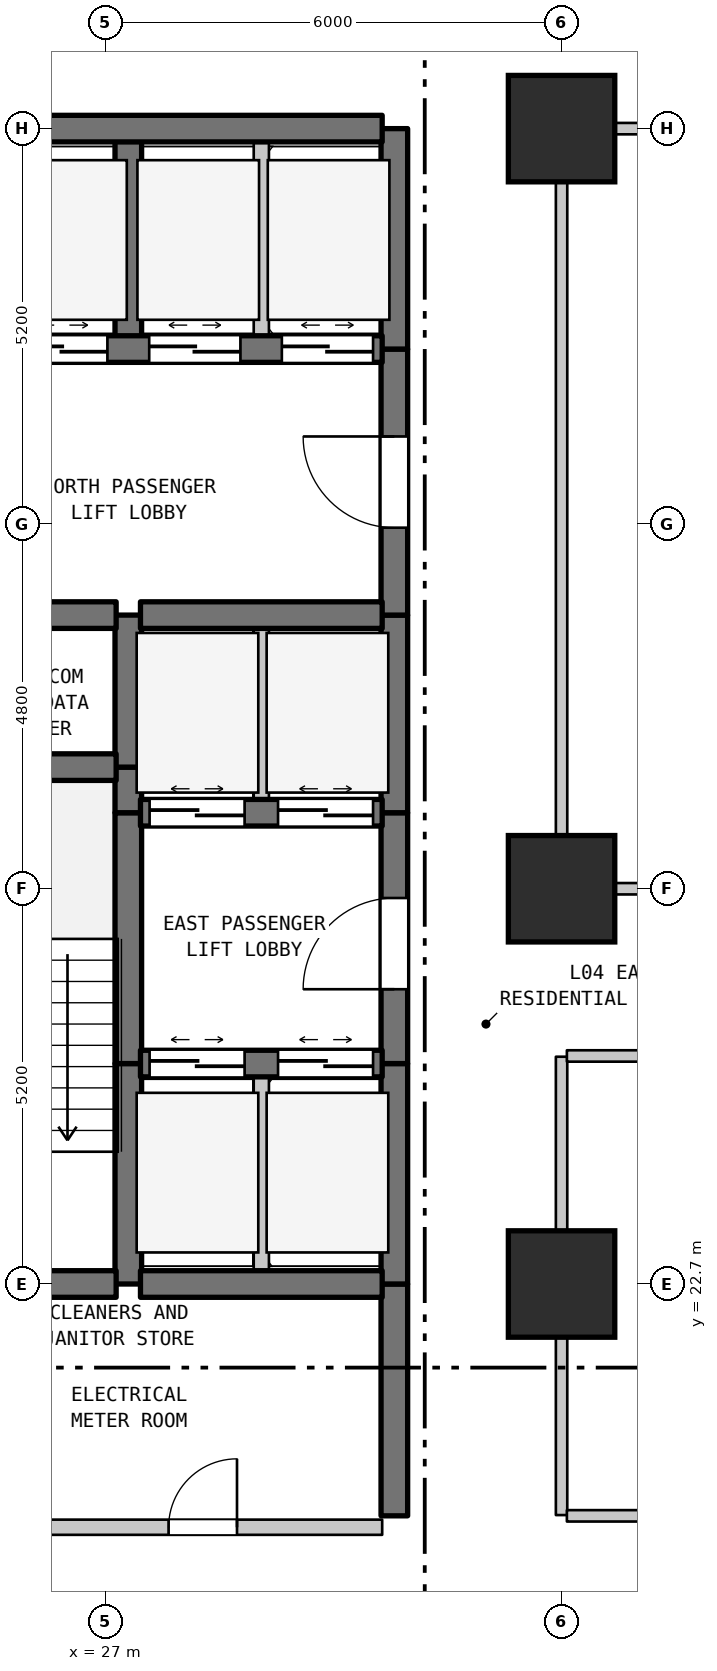
"""IFC4 building model, lengths in metres.
Left out: names, types, materials, properties, quantities, classifications, styles, units other than length and angle.
Written with IfcOpenShell. Run it as: python <this file> out.ifc"""

import sys

from ifc_helpers import new_model, si_unit, direction, frame, frame_2d, origin, origin_2d, place, context, subcontext, project, spatial, rectangle, extrude, element, fill, save


model = new_model("IFC4")
c1 = context("Model", 3, precision=1e-05, world=origin(), true_north=direction((0.0, 1.0)))
c2 = subcontext(c1, "Body", "Model", "MODEL_VIEW")
j1 = project(units=[si_unit("LENGTHUNIT", "METRE"), si_unit("PLANEANGLEUNIT", "RADIAN")], contexts=[c1])
p1 = place(None, origin())
s1 = spatial("IfcSite", under=j1, at=p1, CompositionType="ELEMENT")
p2 = place(p1, origin())
s2 = spatial("IfcBuilding", under=s1, at=p2, CompositionType="ELEMENT")
p3 = place(p2, frame((0.0, 0.0, 24.0)))
s3 = spatial("IfcBuildingStorey", under=s2, at=p3, CompositionType="ELEMENT", Elevation=24.0)
for number, where, z_axis, x_axis in (
    (1, (33.0, 22.7, 0.0), (0.0, 0.0, 1.0), (1.0, 0.0, 0.0)),
    (2, (33.0, 27.9, 0.0), (0.0, 0.0, 1.0), (1.0, 0.0, 0.0)),
    (3, (33.0, 37.9, 0.0), (0.0, 0.0, 1.0), (1.0, 0.0, 0.0)),
):
    element("IfcColumn", number, at=place(p3, frame(where, z_axis=z_axis, x_axis=x_axis)), inside=s3, PredefinedType="COLUMN", context=c2, shape_type="SweptSolid", body=[
        extrude(rectangle(XDim=1.4, YDim=1.4, at=origin_2d()), origin(), (0.0, 0.0, 1.0), 3.7),
    ])
p4 = place(p3, frame((27.3, 22.7, 0.0), z_axis=(0.0, 0.0, 1.0), x_axis=(0.0, 1.0, 0.0)))
e4 = element("IfcWall", 4, at=p4, inside=s3, PredefinedType="SHEAR", context=c2, shape_type="SweptSolid", body=[
    extrude(rectangle(XDim=2.9, YDim=0.35, at=frame_2d((1.45, 0.0))), origin(), (0.0, 0.0, 1.0), 3.385),
])
p5 = place(p3, frame((27.3, 25.6, 0.0), z_axis=(0.0, 0.0, 1.0), x_axis=(0.0, 1.0, 0.0)))
e5 = element("IfcWall", 5, at=p5, inside=s3, PredefinedType="SHEAR", context=c2, shape_type="SweptSolid", body=[
    extrude(rectangle(XDim=3.3, YDim=0.35, at=frame_2d((1.65, 0.0))), origin(), (0.0, 0.0, 1.0), 3.385),
])
p6 = place(p3, frame((27.3, 28.9, 0.0), z_axis=(0.0, 0.0, 1.0), x_axis=(0.0, 1.0, 0.0)))
e6 = element("IfcWall", 6, at=p6, inside=s3, PredefinedType="SHEAR", context=c2, shape_type="SweptSolid", body=[
    extrude(rectangle(XDim=0.6, YDim=0.35, at=frame_2d((0.3, 0.0))), origin(), (0.0, 0.0, 1.0), 3.385),
])
p7 = place(p3, frame((27.3, 29.5, 0.0), z_axis=(0.0, 0.0, 1.0), x_axis=(0.0, 1.0, 0.0)))
e7 = element("IfcWall", 7, at=p7, inside=s3, PredefinedType="SHEAR", context=c2, shape_type="SweptSolid", body=[
    extrude(rectangle(XDim=2.0, YDim=0.35, at=frame_2d((1.0, 0.0))), origin(), (0.0, 0.0, 1.0), 3.385),
])
p8 = place(p3, frame((27.3, 35.0, 0.0), z_axis=(0.0, 0.0, 1.0), x_axis=(0.0, 1.0, 0.0)))
e8 = element("IfcWall", 8, at=p8, inside=s3, PredefinedType="SHEAR", context=c2, shape_type="SweptSolid", body=[
    extrude(rectangle(XDim=2.9, YDim=0.35, at=frame_2d((1.45, 0.0))), origin(), (0.0, 0.0, 1.0), 3.385),
])
p9 = place(p3, frame((29.05, 22.7, 0.0), z_axis=(0.0, 0.0, 1.0), x_axis=(0.0, 1.0, 0.0)))
e9 = element("IfcWall", 9, at=p9, inside=s3, PredefinedType="STANDARD", context=c2, shape_type="SweptSolid", body=[
    extrude(rectangle(XDim=2.9, YDim=0.2, at=frame_2d((1.45, 0.0))), origin(), (0.0, 0.0, 1.0), 3.385),
])
p10 = place(p3, frame((29.05, 28.9, 0.0), z_axis=(0.0, 0.0, 1.0), x_axis=(0.0, 1.0, 0.0)))
e10 = element("IfcWall", 10, at=p10, inside=s3, PredefinedType="STANDARD", context=c2, shape_type="SweptSolid", body=[
    extrude(rectangle(XDim=2.6, YDim=0.2, at=frame_2d((1.3, 0.0))), origin(), (0.0, 0.0, 1.0), 3.385),
])
p11 = place(p3, frame((29.05, 35.0, 0.0), z_axis=(0.0, 0.0, 1.0), x_axis=(0.0, 1.0, 0.0)))
e11 = element("IfcWall", 11, at=p11, inside=s3, PredefinedType="STANDARD", context=c2, shape_type="SweptSolid", body=[
    extrude(rectangle(XDim=2.9, YDim=0.2, at=frame_2d((1.45, 0.0))), origin(), (0.0, 0.0, 1.0), 3.385),
])
p12 = place(p3, frame((30.8, 19.65, 0.0), z_axis=(0.0, 0.0, 1.0), x_axis=(0.0, 1.0, 0.0)))
e12 = element("IfcWall", 12, at=p12, inside=s3, PredefinedType="SHEAR", context=c2, shape_type="SweptSolid", body=[
    extrude(rectangle(XDim=3.05, YDim=0.35, at=frame_2d((1.525, 0.0))), origin(), (0.0, 0.0, 1.0), 3.385),
])
p13 = place(p3, frame((30.8, 22.7, 0.0), z_axis=(0.0, 0.0, 1.0), x_axis=(0.0, 1.0, 0.0)))
e13 = element("IfcWall", 13, at=p13, inside=s3, PredefinedType="SHEAR", context=c2, shape_type="SweptSolid", body=[
    extrude(rectangle(XDim=2.9, YDim=0.35, at=frame_2d((1.45, 0.0))), origin(), (0.0, 0.0, 1.0), 3.385),
])
p14 = place(p3, frame((30.8, 25.6, 0.0), z_axis=(0.0, 0.0, 1.0), x_axis=(0.0, 1.0, 0.0)))
e14 = element("IfcWall", 14, at=p14, inside=s3, PredefinedType="SHEAR", context=c2, shape_type="SweptSolid", body=[
    extrude(rectangle(XDim=3.3, YDim=0.35, at=frame_2d((1.65, 0.0))), origin(), (0.0, 0.0, 1.0), 3.385),
])
p15 = place(p14, frame((0.978, 0.0, 0.0)))
e15 = element("IfcOpeningElement", 15, at=p15, cuts=e14, PredefinedType="OPENING", context=c2, shape_type="SweptSolid", body=[
    extrude(rectangle(XDim=1.2, YDim=2.2, at=frame_2d((0.6, 1.1))), frame((0.0, 0.185, 0.0), z_axis=(0.0, -1.0, 0.0), x_axis=(1.0, 0.0, 0.0)), (0.0, 0.0, 1.0), 0.37),
])
p16 = place(p3, frame((30.8, 28.9, 0.0), z_axis=(0.0, 0.0, 1.0), x_axis=(0.0, 1.0, 0.0)))
e16 = element("IfcWall", 16, at=p16, inside=s3, PredefinedType="SHEAR", context=c2, shape_type="SweptSolid", body=[
    extrude(rectangle(XDim=2.6, YDim=0.35, at=frame_2d((1.3, 0.0))), origin(), (0.0, 0.0, 1.0), 3.385),
])
p17 = place(p3, frame((30.8, 31.5, 0.0), z_axis=(0.0, 0.0, 1.0), x_axis=(0.0, 1.0, 0.0)))
e17 = element("IfcWall", 17, at=p17, inside=s3, PredefinedType="SHEAR", context=c2, shape_type="SweptSolid", body=[
    extrude(rectangle(XDim=3.5, YDim=0.35, at=frame_2d((1.75, 0.0))), origin(), (0.0, 0.0, 1.0), 3.385),
])
p18 = place(p17, frame((1.15, 0.0, 0.0)))
e18 = element("IfcOpeningElement", 18, at=p18, cuts=e17, PredefinedType="OPENING", context=c2, shape_type="SweptSolid", body=[
    extrude(rectangle(XDim=1.2, YDim=2.2, at=frame_2d((0.6, 1.1))), frame((0.0, 0.185, 0.0), z_axis=(0.0, -1.0, 0.0), x_axis=(1.0, 0.0, 0.0)), (0.0, 0.0, 1.0), 0.37),
])
p19 = place(p3, frame((30.8, 35.0, 0.0), z_axis=(0.0, 0.0, 1.0), x_axis=(0.0, 1.0, 0.0)))
e19 = element("IfcWall", 19, at=p19, inside=s3, PredefinedType="SHEAR", context=c2, shape_type="SweptSolid", body=[
    extrude(rectangle(XDim=2.9, YDim=0.35, at=frame_2d((1.45, 0.0))), origin(), (0.0, 0.0, 1.0), 3.385),
])
p20 = place(p3, frame((33.0, 19.66, 0.0), z_axis=(0.0, 0.0, 1.0), x_axis=(0.0, 1.0, 0.0)))
e20 = element("IfcWall", 20, at=p20, inside=s3, PredefinedType="STANDARD", context=c2, shape_type="SweptSolid", body=[
    extrude(rectangle(XDim=6.03, YDim=0.15, at=frame_2d((3.015, 0.0))), origin(), (0.0, 0.0, 1.0), 2.885),
])
p21 = place(p3, frame((33.0, 27.91, 0.0), z_axis=(0.0, 0.0, 1.0), x_axis=(0.0, 1.0, 0.0)))
e21 = element("IfcWall", 21, at=p21, inside=s3, PredefinedType="STANDARD", context=c2, shape_type="SweptSolid", body=[
    extrude(rectangle(XDim=9.98, YDim=0.15, at=frame_2d((4.99, 0.0))), origin(), (0.0, 0.0, 1.0), 2.885),
])
p22 = place(p3, frame((25.985, 19.5, 0.0), z_axis=(0.0, 0.0, 1.0), x_axis=(1.0, 0.0, 0.0)))
e22 = element("IfcWall", 22, at=p22, inside=s3, PredefinedType="STANDARD", context=c2, shape_type="SweptSolid", body=[
    extrude(rectangle(XDim=4.655, YDim=0.2, at=frame_2d((2.327, 0.0))), origin(), (0.0, 0.0, 1.0), 3.385),
])
p23 = place(p22, frame((1.845, 0.0, 0.0)))
e23 = element("IfcOpeningElement", 23, at=p23, cuts=e22, PredefinedType="OPENING", context=c2, shape_type="SweptSolid", body=[
    extrude(rectangle(XDim=0.9, YDim=2.15, at=frame_2d((0.45, 1.075))), frame((0.0, 0.11, 0.0), z_axis=(0.0, -1.0, 0.0), x_axis=(1.0, 0.0, 0.0)), (0.0, 0.0, 1.0), 0.22),
])
p24 = place(p3, frame((33.07, 19.65, 0.0), z_axis=(0.0, 0.0, 1.0), x_axis=(1.0, 0.0, 0.0)))
e24 = element("IfcWall", 24, at=p24, inside=s3, PredefinedType="STANDARD", context=c2, shape_type="SweptSolid", body=[
    extrude(rectangle(XDim=33.27, YDim=0.15, at=frame_2d((16.635, 0.0))), origin(), (0.0, 0.0, 1.0), 3.385),
])
p25 = place(p24, frame((16.065, 0.0, 0.0)))
e25 = element("IfcOpeningElement", 25, at=p25, cuts=e24, PredefinedType="OPENING", context=c2, shape_type="SweptSolid", body=[
    extrude(rectangle(XDim=1.0, YDim=2.15, at=frame_2d((0.5, 1.075))), frame((0.0, 0.085, 0.0), z_axis=(0.0, -1.0, 0.0), x_axis=(1.0, 0.0, 0.0)), (0.0, 0.0, 1.0), 0.17),
])
p26 = place(p3, frame((25.985, 22.7, 0.0), z_axis=(0.0, 0.0, 1.0), x_axis=(1.0, 0.0, 0.0)))
e26 = element("IfcWall", 26, at=p26, inside=s3, PredefinedType="SHEAR", context=c2, shape_type="SweptSolid", body=[
    extrude(rectangle(XDim=1.155, YDim=0.35, at=frame_2d((0.577, 0.0))), origin(), (0.0, 0.0, 1.0), 3.385),
])
p27 = place(p3, frame((27.46, 22.7, 0.0), z_axis=(0.0, 0.0, 1.0), x_axis=(1.0, 0.0, 0.0)))
e27 = element("IfcWall", 27, at=p27, inside=s3, PredefinedType="SHEAR", context=c2, shape_type="SweptSolid", body=[
    extrude(rectangle(XDim=3.18, YDim=0.35, at=frame_2d((1.59, 0.0))), origin(), (0.0, 0.0, 1.0), 3.385),
])
p28 = place(p3, frame((27.46, 25.6, 0.0), z_axis=(0.0, 0.0, 1.0), x_axis=(1.0, 0.0, 0.0)))
e28 = element("IfcWall", 28, at=p28, inside=s3, PredefinedType="SHEAR", context=c2, shape_type="SweptSolid", body=[
    extrude(rectangle(XDim=3.18, YDim=0.35, at=frame_2d((1.59, 0.0))), origin(), (0.0, 0.0, 1.0), 3.385),
])
p29 = place(p28, frame((0.12, 0.0, 0.0)))
e29 = element("IfcOpeningElement", 29, at=p29, cuts=e28, PredefinedType="OPENING", context=c2, shape_type="SweptSolid", body=[
    extrude(rectangle(XDim=1.25, YDim=2.2, at=frame_2d((0.625, 1.1))), frame((0.0, 0.185, 0.0), z_axis=(0.0, -1.0, 0.0), x_axis=(1.0, 0.0, 0.0)), (0.0, 0.0, 1.0), 0.37),
])
p30 = place(p28, frame((1.81, 0.0, 0.0)))
e30 = element("IfcOpeningElement", 30, at=p30, cuts=e28, PredefinedType="OPENING", context=c2, shape_type="SweptSolid", body=[
    extrude(rectangle(XDim=1.25, YDim=2.2, at=frame_2d((0.625, 1.1))), frame((0.0, 0.185, 0.0), z_axis=(0.0, -1.0, 0.0), x_axis=(1.0, 0.0, 0.0)), (0.0, 0.0, 1.0), 0.37),
])
p31 = place(p3, frame((33.07, 25.7, 0.0), z_axis=(0.0, 0.0, 1.0), x_axis=(1.0, 0.0, 0.0)))
e31 = element("IfcWall", 31, at=p31, inside=s3, PredefinedType="STANDARD", context=c2, shape_type="SweptSolid", body=[
    extrude(rectangle(XDim=30.87, YDim=0.15, at=frame_2d((15.435, 0.0))), origin(), (0.0, 0.0, 1.0), 3.385),
])
p32 = place(p3, frame((33.07, 27.9, 0.0), z_axis=(0.0, 0.0, 1.0), x_axis=(1.0, 0.0, 0.0)))
e32 = element("IfcWall", 32, at=p32, inside=s3, PredefinedType="STANDARD", context=c2, shape_type="SweptSolid", body=[
    extrude(rectangle(XDim=30.87, YDim=0.15, at=frame_2d((15.435, 0.0))), origin(), (0.0, 0.0, 1.0), 2.885),
])
p33 = place(p32, frame((14.935, 0.0, 0.0)))
e33 = element("IfcOpeningElement", 33, at=p33, cuts=e32, PredefinedType="OPENING", context=c2, shape_type="SweptSolid", body=[
    extrude(rectangle(XDim=1.0, YDim=2.15, at=frame_2d((0.5, 1.075))), frame((0.0, 0.085, 0.0), z_axis=(0.0, -1.0, 0.0), x_axis=(1.0, 0.0, 0.0)), (0.0, 0.0, 1.0), 0.17),
])
p34 = place(p3, frame((27.46, 28.9, 0.0), z_axis=(0.0, 0.0, 1.0), x_axis=(1.0, 0.0, 0.0)))
e34 = element("IfcWall", 34, at=p34, inside=s3, PredefinedType="SHEAR", context=c2, shape_type="SweptSolid", body=[
    extrude(rectangle(XDim=3.18, YDim=0.35, at=frame_2d((1.59, 0.0))), origin(), (0.0, 0.0, 1.0), 3.385),
])
p35 = place(p34, frame((0.12, 0.0, 0.0)))
e35 = element("IfcOpeningElement", 35, at=p35, cuts=e34, PredefinedType="OPENING", context=c2, shape_type="SweptSolid", body=[
    extrude(rectangle(XDim=1.25, YDim=2.2, at=frame_2d((0.625, 1.1))), frame((0.0, 0.185, 0.0), z_axis=(0.0, -1.0, 0.0), x_axis=(1.0, 0.0, 0.0)), (0.0, 0.0, 1.0), 0.37),
])
p36 = place(p34, frame((1.81, 0.0, 0.0)))
e36 = element("IfcOpeningElement", 36, at=p36, cuts=e34, PredefinedType="OPENING", context=c2, shape_type="SweptSolid", body=[
    extrude(rectangle(XDim=1.25, YDim=2.2, at=frame_2d((0.625, 1.1))), frame((0.0, 0.185, 0.0), z_axis=(0.0, -1.0, 0.0), x_axis=(1.0, 0.0, 0.0)), (0.0, 0.0, 1.0), 0.37),
])
p37 = place(p3, frame((23.96, 29.5, 0.0), z_axis=(0.0, 0.0, 1.0), x_axis=(1.0, 0.0, 0.0)))
e37 = element("IfcWall", 37, at=p37, inside=s3, PredefinedType="SHEAR", context=c2, shape_type="SweptSolid", body=[
    extrude(rectangle(XDim=3.18, YDim=0.35, at=frame_2d((1.59, 0.0))), origin(), (0.0, 0.0, 1.0), 3.385),
])
p38 = place(p3, frame((23.96, 31.5, 0.0), z_axis=(0.0, 0.0, 1.0), x_axis=(1.0, 0.0, 0.0)))
e38 = element("IfcWall", 38, at=p38, inside=s3, PredefinedType="SHEAR", context=c2, shape_type="SweptSolid", body=[
    extrude(rectangle(XDim=3.18, YDim=0.35, at=frame_2d((1.59, 0.0))), origin(), (0.0, 0.0, 1.0), 3.385),
])
p39 = place(p38, frame((1.094, 0.0, 0.0)))
e39 = element("IfcOpeningElement", 39, at=p39, cuts=e38, PredefinedType="OPENING", context=c2, shape_type="SweptSolid", body=[
    extrude(rectangle(XDim=0.85, YDim=2.1, at=frame_2d((0.425, 1.05))), frame((0.0, 0.185, 0.0), z_axis=(0.0, -1.0, 0.0), x_axis=(1.0, 0.0, 0.0)), (0.0, 0.0, 1.0), 0.37),
])
p40 = place(p3, frame((27.46, 31.5, 0.0), z_axis=(0.0, 0.0, 1.0), x_axis=(1.0, 0.0, 0.0)))
e40 = element("IfcWall", 40, at=p40, inside=s3, PredefinedType="SHEAR", context=c2, shape_type="SweptSolid", body=[
    extrude(rectangle(XDim=3.18, YDim=0.35, at=frame_2d((1.59, 0.0))), origin(), (0.0, 0.0, 1.0), 3.385),
])
p41 = place(p3, frame((19.16, 35.0, 0.0), z_axis=(0.0, 0.0, 1.0), x_axis=(1.0, 0.0, 0.0)))
e41 = element("IfcWall", 41, at=p41, inside=s3, PredefinedType="SHEAR", context=c2, shape_type="SweptSolid", body=[
    extrude(rectangle(XDim=11.48, YDim=0.35, at=frame_2d((5.74, 0.0))), origin(), (0.0, 0.0, 1.0), 3.385),
])
p42 = place(p41, frame((0.365, 0.0, 0.0)))
e42 = element("IfcOpeningElement", 42, at=p42, cuts=e41, PredefinedType="OPENING", context=c2, shape_type="SweptSolid", body=[
    extrude(rectangle(XDim=1.35, YDim=2.2, at=frame_2d((0.675, 1.1))), frame((0.0, 0.185, 0.0), z_axis=(0.0, -1.0, 0.0), x_axis=(1.0, 0.0, 0.0)), (0.0, 0.0, 1.0), 0.37),
])
p43 = place(p41, frame((2.765, 0.0, 0.0)))
e43 = element("IfcOpeningElement", 43, at=p43, cuts=e41, PredefinedType="OPENING", context=c2, shape_type="SweptSolid", body=[
    extrude(rectangle(XDim=1.35, YDim=2.2, at=frame_2d((0.675, 1.1))), frame((0.0, 0.185, 0.0), z_axis=(0.0, -1.0, 0.0), x_axis=(1.0, 0.0, 0.0)), (0.0, 0.0, 1.0), 0.37),
])
p44 = place(p41, frame((4.915, 0.0, 0.0)))
e44 = element("IfcOpeningElement", 44, at=p44, cuts=e41, PredefinedType="OPENING", context=c2, shape_type="SweptSolid", body=[
    extrude(rectangle(XDim=1.2, YDim=2.2, at=frame_2d((0.6, 1.1))), frame((0.0, 0.185, 0.0), z_axis=(0.0, -1.0, 0.0), x_axis=(1.0, 0.0, 0.0)), (0.0, 0.0, 1.0), 0.37),
])
p45 = place(p41, frame((6.665, 0.0, 0.0)))
e45 = element("IfcOpeningElement", 45, at=p45, cuts=e41, PredefinedType="OPENING", context=c2, shape_type="SweptSolid", body=[
    extrude(rectangle(XDim=1.2, YDim=2.2, at=frame_2d((0.6, 1.1))), frame((0.0, 0.185, 0.0), z_axis=(0.0, -1.0, 0.0), x_axis=(1.0, 0.0, 0.0)), (0.0, 0.0, 1.0), 0.37),
])
p46 = place(p41, frame((8.415, 0.0, 0.0)))
e46 = element("IfcOpeningElement", 46, at=p46, cuts=e41, PredefinedType="OPENING", context=c2, shape_type="SweptSolid", body=[
    extrude(rectangle(XDim=1.2, YDim=2.2, at=frame_2d((0.6, 1.1))), frame((0.0, 0.185, 0.0), z_axis=(0.0, -1.0, 0.0), x_axis=(1.0, 0.0, 0.0)), (0.0, 0.0, 1.0), 0.37),
])
p47 = place(p41, frame((10.16, 0.0, 0.0)))
e47 = element("IfcOpeningElement", 47, at=p47, cuts=e41, PredefinedType="OPENING", context=c2, shape_type="SweptSolid", body=[
    extrude(rectangle(XDim=1.2, YDim=2.2, at=frame_2d((0.6, 1.1))), frame((0.0, 0.185, 0.0), z_axis=(0.0, -1.0, 0.0), x_axis=(1.0, 0.0, 0.0)), (0.0, 0.0, 1.0), 0.37),
])
p48 = place(p3, frame((19.16, 37.9, 0.0), z_axis=(0.0, 0.0, 1.0), x_axis=(1.0, 0.0, 0.0)))
e48 = element("IfcWall", 48, at=p48, inside=s3, PredefinedType="SHEAR", context=c2, shape_type="SweptSolid", body=[
    extrude(rectangle(XDim=11.48, YDim=0.35, at=frame_2d((5.74, 0.0))), origin(), (0.0, 0.0, 1.0), 3.385),
])
p49 = place(p3, frame((33.07, 37.9, 0.0), z_axis=(0.0, 0.0, 1.0), x_axis=(1.0, 0.0, 0.0)))
e49 = element("IfcWall", 49, at=p49, inside=s3, PredefinedType="STANDARD", context=c2, shape_type="SweptSolid", body=[
    extrude(rectangle(XDim=26.935, YDim=0.15, at=frame_2d((13.467, 0.0))), origin(), (0.0, 0.0, 1.0), 3.385),
])
p50 = place(p15, origin())
e50 = element("IfcDoor", 50, at=p50, inside=s3, OperationType="SINGLE_SWING_LEFT", PredefinedType="DOOR", context=c2, shape_type="SweptSolid", body=[
    extrude(rectangle(XDim=1.2, YDim=2.2, at=frame_2d((0.6, 1.1))), frame((0.0, 0.025, 0.0), z_axis=(0.0, -1.0, 0.0), x_axis=(1.0, 0.0, 0.0)), (0.0, 0.0, 1.0), 0.05),
])
fill(e15, e50)
p51 = place(p18, origin())
e51 = element("IfcDoor", 51, at=p51, inside=s3, OperationType="SINGLE_SWING_RIGHT", PredefinedType="DOOR", context=c2, shape_type="SweptSolid", body=[
    extrude(rectangle(XDim=1.2, YDim=2.2, at=frame_2d((0.6, 1.1))), frame((0.0, 0.025, 0.0), z_axis=(0.0, -1.0, 0.0), x_axis=(1.0, 0.0, 0.0)), (0.0, 0.0, 1.0), 0.05),
])
fill(e18, e51)
p52 = place(p23, origin())
e52 = element("IfcDoor", 52, at=p52, inside=s3, OperationType="SINGLE_SWING_RIGHT", PredefinedType="DOOR", context=c2, shape_type="SweptSolid", body=[
    extrude(rectangle(XDim=0.9, YDim=2.15, at=frame_2d((0.45, 1.075))), frame((0.0, 0.025, 0.0), z_axis=(0.0, -1.0, 0.0), x_axis=(1.0, 0.0, 0.0)), (0.0, 0.0, 1.0), 0.05),
])
fill(e23, e52)
p53 = place(p29, origin())
e53 = element("IfcDoor", 53, at=p53, inside=s3, OperationType="DOUBLE_DOOR_SLIDING", PredefinedType="DOOR", context=c2, shape_type="SweptSolid", body=[
    extrude(rectangle(XDim=1.25, YDim=2.2, at=frame_2d((0.625, 1.1))), frame((0.0, 0.025, 0.0), z_axis=(0.0, -1.0, 0.0), x_axis=(1.0, 0.0, 0.0)), (0.0, 0.0, 1.0), 0.05),
])
fill(e29, e53)
p54 = place(p30, origin())
e54 = element("IfcDoor", 54, at=p54, inside=s3, OperationType="DOUBLE_DOOR_SLIDING", PredefinedType="DOOR", context=c2, shape_type="SweptSolid", body=[
    extrude(rectangle(XDim=1.25, YDim=2.2, at=frame_2d((0.625, 1.1))), frame((0.0, 0.025, 0.0), z_axis=(0.0, -1.0, 0.0), x_axis=(1.0, 0.0, 0.0)), (0.0, 0.0, 1.0), 0.05),
])
fill(e30, e54)
p55 = place(p35, origin())
e55 = element("IfcDoor", 55, at=p55, inside=s3, OperationType="DOUBLE_DOOR_SLIDING", PredefinedType="DOOR", context=c2, shape_type="SweptSolid", body=[
    extrude(rectangle(XDim=1.25, YDim=2.2, at=frame_2d((0.625, 1.1))), frame((0.0, 0.025, 0.0), z_axis=(0.0, -1.0, 0.0), x_axis=(1.0, 0.0, 0.0)), (0.0, 0.0, 1.0), 0.05),
])
fill(e35, e55)
p56 = place(p36, origin())
e56 = element("IfcDoor", 56, at=p56, inside=s3, OperationType="DOUBLE_DOOR_SLIDING", PredefinedType="DOOR", context=c2, shape_type="SweptSolid", body=[
    extrude(rectangle(XDim=1.25, YDim=2.2, at=frame_2d((0.625, 1.1))), frame((0.0, 0.025, 0.0), z_axis=(0.0, -1.0, 0.0), x_axis=(1.0, 0.0, 0.0)), (0.0, 0.0, 1.0), 0.05),
])
fill(e36, e56)
p57 = place(p45, origin())
e57 = element("IfcDoor", 57, at=p57, inside=s3, OperationType="DOUBLE_DOOR_SLIDING", PredefinedType="DOOR", context=c2, shape_type="SweptSolid", body=[
    extrude(rectangle(XDim=1.2, YDim=2.2, at=frame_2d((0.6, 1.1))), frame((0.0, 0.025, 0.0), z_axis=(0.0, -1.0, 0.0), x_axis=(1.0, 0.0, 0.0)), (0.0, 0.0, 1.0), 0.05),
])
fill(e45, e57)
p58 = place(p46, origin())
e58 = element("IfcDoor", 58, at=p58, inside=s3, OperationType="DOUBLE_DOOR_SLIDING", PredefinedType="DOOR", context=c2, shape_type="SweptSolid", body=[
    extrude(rectangle(XDim=1.2, YDim=2.2, at=frame_2d((0.6, 1.1))), frame((0.0, 0.025, 0.0), z_axis=(0.0, -1.0, 0.0), x_axis=(1.0, 0.0, 0.0)), (0.0, 0.0, 1.0), 0.05),
])
fill(e46, e58)
p59 = place(p47, origin())
e59 = element("IfcDoor", 59, at=p59, inside=s3, OperationType="DOUBLE_DOOR_SLIDING", PredefinedType="DOOR", context=c2, shape_type="SweptSolid", body=[
    extrude(rectangle(XDim=1.2, YDim=2.2, at=frame_2d((0.6, 1.1))), frame((0.0, 0.025, 0.0), z_axis=(0.0, -1.0, 0.0), x_axis=(1.0, 0.0, 0.0)), (0.0, 0.0, 1.0), 0.05),
])
fill(e47, e59)
save(model, sys.argv[1])
